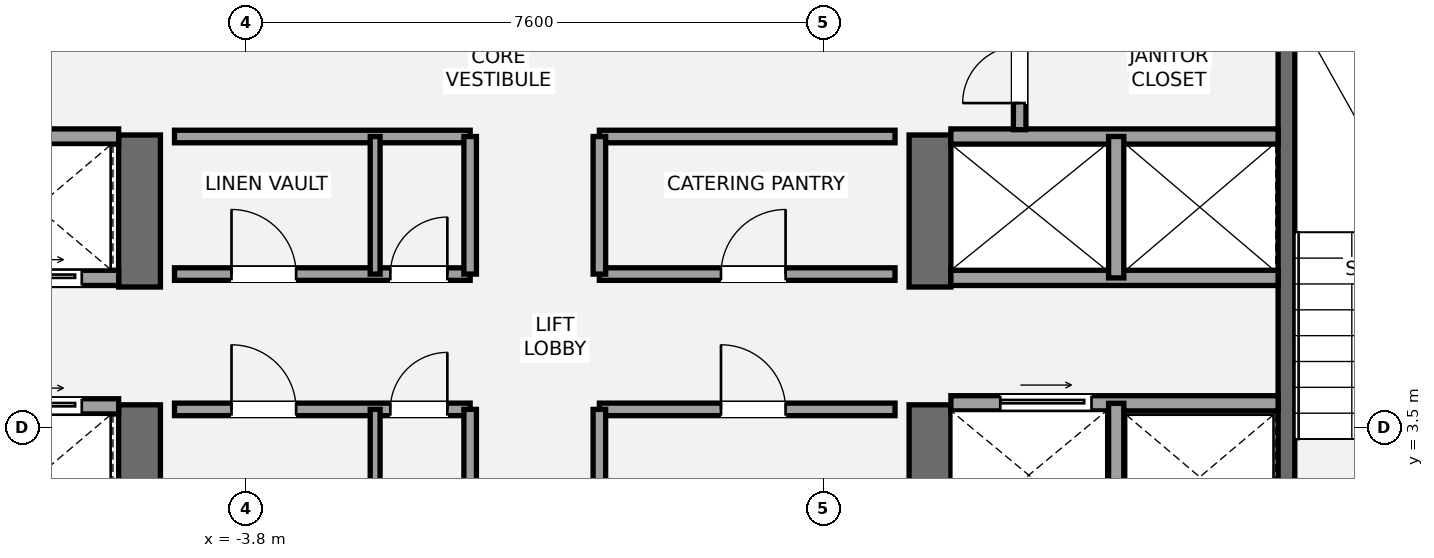
"""IFC4 building model, lengths in metres.
Left out: names, types, materials, properties, quantities, classifications, styles, units other than length and angle.
Written with IfcOpenShell. Run it as: python <this file> out.ifc"""

import sys

from ifc_helpers import new_model, si_unit, direction, frame, frame_2d, origin, place, context, subcontext, project, spatial, rectangle, extrude, element, fill, save


model = new_model("IFC4")
c1 = context("Model", 3, precision=1e-05, world=origin(), true_north=direction((0.0, 1.0)))
c2 = subcontext(c1, "Body", "Model", "MODEL_VIEW")
j1 = project(units=[si_unit("LENGTHUNIT", "METRE"), si_unit("PLANEANGLEUNIT", "RADIAN")], contexts=[c1])
p1 = place(None, origin())
s1 = spatial("IfcSite", under=j1, at=p1, CompositionType="ELEMENT")
p2 = place(p1, origin())
s2 = spatial("IfcBuilding", under=s1, at=p2, CompositionType="ELEMENT")
p3 = place(p2, frame((0.0, 0.0, 241.5)))
s3 = spatial("IfcBuildingStorey", under=s2, at=p3, CompositionType="ELEMENT", Elevation=241.5)
p4 = place(p3, frame((-5.2, 1.3, 0.0), z_axis=(0.0, 0.0, 1.0), x_axis=(0.0, 1.0, 0.0)))
e1 = element("IfcWall", 1, at=p4, inside=s3, PredefinedType="SHEAR", context=c2, shape_type="SweptSolid", body=[
    extrude(rectangle(XDim=2.5, YDim=0.55, at=frame_2d((1.25, 0.0))), origin(), (0.0, 0.0, 1.0), 3.15),
])
p5 = place(p3, frame((-5.2, 5.35, 0.0), z_axis=(0.0, 0.0, 1.0), x_axis=(0.0, 1.0, 0.0)))
e2 = element("IfcWall", 2, at=p5, inside=s3, PredefinedType="SHEAR", context=c2, shape_type="SweptSolid", body=[
    extrude(rectangle(XDim=2.0, YDim=0.55, at=frame_2d((1.0, 0.0))), origin(), (0.0, 0.0, 1.0), 3.15),
])
p6 = place(p3, frame((5.2, 1.3, 0.0), z_axis=(0.0, 0.0, 1.0), x_axis=(0.0, 1.0, 0.0)))
e3 = element("IfcWall", 3, at=p6, inside=s3, PredefinedType="SHEAR", context=c2, shape_type="SweptSolid", body=[
    extrude(rectangle(XDim=2.5, YDim=0.55, at=frame_2d((1.25, 0.0))), origin(), (0.0, 0.0, 1.0), 3.15),
])
p7 = place(p3, frame((5.2, 5.35, 0.0), z_axis=(0.0, 0.0, 1.0), x_axis=(0.0, 1.0, 0.0)))
e4 = element("IfcWall", 4, at=p7, inside=s3, PredefinedType="SHEAR", context=c2, shape_type="SweptSolid", body=[
    extrude(rectangle(XDim=2.0, YDim=0.55, at=frame_2d((1.0, 0.0))), origin(), (0.0, 0.0, 1.0), 3.15),
])
p8 = place(p3, frame((9.89, 1.85, 0.0), z_axis=(0.0, 0.0, 1.0), x_axis=(0.0, 1.0, 0.0)))
e5 = element("IfcWall", 5, at=p8, inside=s3, PredefinedType="SHEAR", context=c2, shape_type="SweptSolid", body=[
    extrude(rectangle(XDim=7.15, YDim=0.22, at=frame_2d((3.575, 0.0))), origin(), (0.0, 0.0, 1.0), 3.15),
])
p9 = place(p3, frame((-9.78, 3.78, 0.0), z_axis=(0.0, 0.0, 1.0), x_axis=(1.0, 0.0, 0.0)))
e6 = element("IfcWall", 6, at=p9, inside=s3, PredefinedType="SOLIDWALL", context=c2, shape_type="SweptSolid", body=[
    extrude(rectangle(XDim=4.305, YDim=0.2, at=frame_2d((2.152, 0.0))), origin(), (0.0, 0.0, 1.0), 2.97),
])
p10 = place(p9, frame((2.72, 0.0, 0.0)))
e7 = element("IfcOpeningElement", 7, at=p10, cuts=e6, PredefinedType="OPENING", context=c2, shape_type="SweptSolid", body=[
    extrude(rectangle(XDim=1.1, YDim=2.2, at=frame_2d((0.55, 1.1))), frame((0.0, 0.11, 0.0), z_axis=(0.0, -1.0, 0.0), x_axis=(1.0, 0.0, 0.0)), (0.0, 0.0, 1.0), 0.22),
])
p11 = place(p3, frame((-9.78, 5.47, 0.0), z_axis=(0.0, 0.0, 1.0), x_axis=(1.0, 0.0, 0.0)))
e8 = element("IfcWall", 8, at=p11, inside=s3, PredefinedType="SOLIDWALL", context=c2, shape_type="SweptSolid", body=[
    extrude(rectangle(XDim=4.305, YDim=0.2, at=frame_2d((2.152, 0.0))), origin(), (0.0, 0.0, 1.0), 2.97),
])
p12 = place(p11, frame((0.55, 0.0, 0.0)))
e9 = element("IfcOpeningElement", 9, at=p12, cuts=e8, PredefinedType="OPENING", context=c2, shape_type="SweptSolid", body=[
    extrude(rectangle(XDim=1.1, YDim=2.2, at=frame_2d((0.55, 1.1))), frame((0.0, 0.11, 0.0), z_axis=(0.0, -1.0, 0.0), x_axis=(1.0, 0.0, 0.0)), (0.0, 0.0, 1.0), 0.22),
])
p13 = place(p11, frame((2.72, 0.0, 0.0)))
e10 = element("IfcOpeningElement", 10, at=p13, cuts=e8, PredefinedType="OPENING", context=c2, shape_type="SweptSolid", body=[
    extrude(rectangle(XDim=1.1, YDim=2.2, at=frame_2d((0.55, 1.1))), frame((0.0, 0.11, 0.0), z_axis=(0.0, -1.0, 0.0), x_axis=(1.0, 0.0, 0.0)), (0.0, 0.0, 1.0), 0.22),
])
p14 = place(p3, frame((-9.78, 7.33, 0.0), z_axis=(0.0, 0.0, 1.0), x_axis=(1.0, 0.0, 0.0)))
e11 = element("IfcWall", 11, at=p14, inside=s3, PredefinedType="SOLIDWALL", context=c2, shape_type="SweptSolid", body=[
    extrude(rectangle(XDim=4.305, YDim=0.2, at=frame_2d((2.152, 0.0))), origin(), (0.0, 0.0, 1.0), 2.97),
])
p15 = place(p3, frame((5.475, 3.82, 0.0), z_axis=(0.0, 0.0, 1.0), x_axis=(1.0, 0.0, 0.0)))
e12 = element("IfcWall", 12, at=p15, inside=s3, PredefinedType="SOLIDWALL", context=c2, shape_type="SweptSolid", body=[
    extrude(rectangle(XDim=4.305, YDim=0.2, at=frame_2d((2.152, 0.0))), origin(), (0.0, 0.0, 1.0), 2.97),
])
p16 = place(p15, frame((0.65, 0.0, 0.0)))
e13 = element("IfcOpeningElement", 13, at=p16, cuts=e12, PredefinedType="OPENING", context=c2, shape_type="SweptSolid", body=[
    extrude(rectangle(XDim=1.2, YDim=2.2, at=frame_2d((0.6, 1.1))), frame((0.0, 0.11, 0.0), z_axis=(0.0, -1.0, 0.0), x_axis=(1.0, 0.0, 0.0)), (0.0, 0.0, 1.0), 0.22),
])
p17 = place(p3, frame((7.65, 1.85, 0.0), z_axis=(0.0, 0.0, 1.0), x_axis=(0.0, 1.0, 0.0)))
e14 = element("IfcWall", 14, at=p17, inside=s3, PredefinedType="SOLIDWALL", context=c2, shape_type="SweptSolid", body=[
    extrude(rectangle(XDim=1.97, YDim=0.2, at=frame_2d((0.985, 0.0))), origin(), (0.0, 0.0, 1.0), 2.97),
])
for number, where, z_axis, x_axis in (
    (15, (5.475, 5.47, 0.0), (0.0, 0.0, 1.0), (1.0, 0.0, 0.0)),
    (16, (5.475, 7.33, 0.0), (0.0, 0.0, 1.0), (1.0, 0.0, 0.0)),
):
    element("IfcWall", number, at=place(p3, frame(where, z_axis=z_axis, x_axis=x_axis)), inside=s3, PredefinedType="SOLIDWALL", context=c2, shape_type="SweptSolid", body=[
        extrude(rectangle(XDim=4.305, YDim=0.2, at=frame_2d((2.152, 0.0))), origin(), (0.0, 0.0, 1.0), 2.97),
    ])
p18 = place(p3, frame((7.65, 5.47, 0.0), z_axis=(0.0, 0.0, 1.0), x_axis=(0.0, 1.0, 0.0)))
e17 = element("IfcWall", 17, at=p18, inside=s3, PredefinedType="SOLIDWALL", context=c2, shape_type="SweptSolid", body=[
    extrude(rectangle(XDim=1.86, YDim=0.2, at=frame_2d((0.93, 0.0))), origin(), (0.0, 0.0, 1.0), 2.97),
])
p19 = place(p3, frame((-4.74, 3.74, 0.0), z_axis=(0.0, 0.0, 1.0), x_axis=(1.0, 0.0, 0.0)))
e18 = element("IfcWall", 18, at=p19, inside=s3, PredefinedType="PARTITIONING", context=c2, shape_type="SweptSolid", body=[
    extrude(rectangle(XDim=3.89, YDim=0.165, at=frame_2d((1.945, 0.0))), origin(), (0.0, 0.0, 1.0), 2.97),
])
p20 = place(p19, frame((0.75, 0.0, 0.0)))
e19 = element("IfcOpeningElement", 19, at=p20, cuts=e18, PredefinedType="OPENING", context=c2, shape_type="SweptSolid", body=[
    extrude(rectangle(XDim=0.85, YDim=2.1, at=frame_2d((0.425, 1.05))), frame((0.0, 0.093, 0.0), z_axis=(0.0, -1.0, 0.0), x_axis=(1.0, 0.0, 0.0)), (0.0, 0.0, 1.0), 0.185),
])
p21 = place(p19, frame((2.84, 0.0, 0.0)))
e20 = element("IfcOpeningElement", 20, at=p21, cuts=e18, PredefinedType="OPENING", context=c2, shape_type="SweptSolid", body=[
    extrude(rectangle(XDim=0.75, YDim=2.1, at=frame_2d((0.375, 1.05))), frame((0.0, 0.093, 0.0), z_axis=(0.0, -1.0, 0.0), x_axis=(1.0, 0.0, 0.0)), (0.0, 0.0, 1.0), 0.185),
])
p22 = place(p3, frame((-0.85, 1.92, 0.0), z_axis=(0.0, 0.0, 1.0), x_axis=(0.0, 1.0, 0.0)))
e21 = element("IfcWall", 21, at=p22, inside=s3, PredefinedType="PARTITIONING", context=c2, shape_type="SweptSolid", body=[
    extrude(rectangle(XDim=1.82, YDim=0.165, at=frame_2d((0.91, 0.0))), origin(), (0.0, 0.0, 1.0), 2.97),
])
p23 = place(p3, frame((0.85, 3.74, 0.0), z_axis=(0.0, 0.0, 1.0), x_axis=(1.0, 0.0, 0.0)))
e22 = element("IfcWall", 22, at=p23, inside=s3, PredefinedType="PARTITIONING", context=c2, shape_type="SweptSolid", body=[
    extrude(rectangle(XDim=3.89, YDim=0.165, at=frame_2d((1.945, 0.0))), origin(), (0.0, 0.0, 1.0), 2.97),
])
p24 = place(p23, frame((1.6, 0.0, 0.0)))
e23 = element("IfcOpeningElement", 23, at=p24, cuts=e22, PredefinedType="OPENING", context=c2, shape_type="SweptSolid", body=[
    extrude(rectangle(XDim=0.85, YDim=2.1, at=frame_2d((0.425, 1.05))), frame((0.0, 0.093, 0.0), z_axis=(0.0, -1.0, 0.0), x_axis=(1.0, 0.0, 0.0)), (0.0, 0.0, 1.0), 0.185),
])
p25 = place(p3, frame((0.85, 1.92, 0.0), z_axis=(0.0, 0.0, 1.0), x_axis=(0.0, 1.0, 0.0)))
e24 = element("IfcWall", 24, at=p25, inside=s3, PredefinedType="PARTITIONING", context=c2, shape_type="SweptSolid", body=[
    extrude(rectangle(XDim=1.82, YDim=0.165, at=frame_2d((0.91, 0.0))), origin(), (0.0, 0.0, 1.0), 2.97),
])
p26 = place(p3, frame((-2.1, 1.92, 0.0), z_axis=(0.0, 0.0, 1.0), x_axis=(0.0, 1.0, 0.0)))
e25 = element("IfcWall", 25, at=p26, inside=s3, PredefinedType="PARTITIONING", context=c2, shape_type="SweptSolid", body=[
    extrude(rectangle(XDim=1.82, YDim=0.13, at=frame_2d((0.91, 0.0))), origin(), (0.0, 0.0, 1.0), 2.97),
])
p27 = place(p3, frame((-4.74, 5.52, 0.0), z_axis=(0.0, 0.0, 1.0), x_axis=(1.0, 0.0, 0.0)))
e26 = element("IfcWall", 26, at=p27, inside=s3, PredefinedType="PARTITIONING", context=c2, shape_type="SweptSolid", body=[
    extrude(rectangle(XDim=3.89, YDim=0.165, at=frame_2d((1.945, 0.0))), origin(), (0.0, 0.0, 1.0), 2.97),
])
p28 = place(p27, frame((0.75, 0.0, 0.0)))
e27 = element("IfcOpeningElement", 27, at=p28, cuts=e26, PredefinedType="OPENING", context=c2, shape_type="SweptSolid", body=[
    extrude(rectangle(XDim=0.85, YDim=2.1, at=frame_2d((0.425, 1.05))), frame((0.0, 0.093, 0.0), z_axis=(0.0, -1.0, 0.0), x_axis=(1.0, 0.0, 0.0)), (0.0, 0.0, 1.0), 0.185),
])
p29 = place(p27, frame((2.84, 0.0, 0.0)))
e28 = element("IfcOpeningElement", 28, at=p29, cuts=e26, PredefinedType="OPENING", context=c2, shape_type="SweptSolid", body=[
    extrude(rectangle(XDim=0.75, YDim=2.1, at=frame_2d((0.375, 1.05))), frame((0.0, 0.093, 0.0), z_axis=(0.0, -1.0, 0.0), x_axis=(1.0, 0.0, 0.0)), (0.0, 0.0, 1.0), 0.185),
])
p30 = place(p3, frame((-4.74, 7.33, 0.0), z_axis=(0.0, 0.0, 1.0), x_axis=(1.0, 0.0, 0.0)))
e29 = element("IfcWall", 29, at=p30, inside=s3, PredefinedType="PARTITIONING", context=c2, shape_type="SweptSolid", body=[
    extrude(rectangle(XDim=3.89, YDim=0.165, at=frame_2d((1.945, 0.0))), origin(), (0.0, 0.0, 1.0), 2.97),
])
p31 = place(p3, frame((-0.85, 5.52, 0.0), z_axis=(0.0, 0.0, 1.0), x_axis=(0.0, 1.0, 0.0)))
e30 = element("IfcWall", 30, at=p31, inside=s3, PredefinedType="PARTITIONING", context=c2, shape_type="SweptSolid", body=[
    extrude(rectangle(XDim=1.81, YDim=0.165, at=frame_2d((0.905, 0.0))), origin(), (0.0, 0.0, 1.0), 2.97),
])
p32 = place(p3, frame((0.85, 5.52, 0.0), z_axis=(0.0, 0.0, 1.0), x_axis=(1.0, 0.0, 0.0)))
e31 = element("IfcWall", 31, at=p32, inside=s3, PredefinedType="PARTITIONING", context=c2, shape_type="SweptSolid", body=[
    extrude(rectangle(XDim=3.89, YDim=0.165, at=frame_2d((1.945, 0.0))), origin(), (0.0, 0.0, 1.0), 2.97),
])
p33 = place(p32, frame((1.6, 0.0, 0.0)))
e32 = element("IfcOpeningElement", 32, at=p33, cuts=e31, PredefinedType="OPENING", context=c2, shape_type="SweptSolid", body=[
    extrude(rectangle(XDim=0.85, YDim=2.1, at=frame_2d((0.425, 1.05))), frame((0.0, 0.093, 0.0), z_axis=(0.0, -1.0, 0.0), x_axis=(1.0, 0.0, 0.0)), (0.0, 0.0, 1.0), 0.185),
])
p34 = place(p3, frame((0.85, 7.33, 0.0), z_axis=(0.0, 0.0, 1.0), x_axis=(1.0, 0.0, 0.0)))
e33 = element("IfcWall", 33, at=p34, inside=s3, PredefinedType="PARTITIONING", context=c2, shape_type="SweptSolid", body=[
    extrude(rectangle(XDim=3.89, YDim=0.165, at=frame_2d((1.945, 0.0))), origin(), (0.0, 0.0, 1.0), 2.97),
])
p35 = place(p3, frame((0.85, 5.52, 0.0), z_axis=(0.0, 0.0, 1.0), x_axis=(0.0, 1.0, 0.0)))
e34 = element("IfcWall", 34, at=p35, inside=s3, PredefinedType="PARTITIONING", context=c2, shape_type="SweptSolid", body=[
    extrude(rectangle(XDim=1.81, YDim=0.165, at=frame_2d((0.905, 0.0))), origin(), (0.0, 0.0, 1.0), 2.97),
])
p36 = place(p3, frame((-2.1, 5.52, 0.0), z_axis=(0.0, 0.0, 1.0), x_axis=(0.0, 1.0, 0.0)))
e35 = element("IfcWall", 35, at=p36, inside=s3, PredefinedType="PARTITIONING", context=c2, shape_type="SweptSolid", body=[
    extrude(rectangle(XDim=1.81, YDim=0.13, at=frame_2d((0.905, 0.0))), origin(), (0.0, 0.0, 1.0), 2.97),
])
p37 = place(p3, frame((6.38, 7.42, 0.0), z_axis=(0.0, 0.0, 1.0), x_axis=(0.0, 1.0, 0.0)))
e36 = element("IfcWall", 36, at=p37, inside=s3, PredefinedType="PARTITIONING", context=c2, shape_type="SweptSolid", body=[
    extrude(rectangle(XDim=1.58, YDim=0.165, at=frame_2d((0.79, 0.0))), origin(), (0.0, 0.0, 1.0), 2.97),
])
p38 = place(p37, frame((0.35, 0.0, 0.0)))
e37 = element("IfcOpeningElement", 37, at=p38, cuts=e36, PredefinedType="OPENING", context=c2, shape_type="SweptSolid", body=[
    extrude(rectangle(XDim=0.75, YDim=2.1, at=frame_2d((0.375, 1.05))), frame((0.0, 0.093, 0.0), z_axis=(0.0, -1.0, 0.0), x_axis=(1.0, 0.0, 0.0)), (0.0, 0.0, 1.0), 0.185),
])
p39 = place(p13, origin())
e38 = element("IfcDoor", 38, at=p39, inside=s3, OperationType="SLIDING_TO_LEFT", PredefinedType="DOOR", context=c2, shape_type="SweptSolid", body=[
    extrude(rectangle(XDim=1.1, YDim=2.2, at=frame_2d((0.55, 1.1))), frame((0.0, 0.025, 0.0), z_axis=(0.0, -1.0, 0.0), x_axis=(1.0, 0.0, 0.0)), (0.0, 0.0, 1.0), 0.05),
])
fill(e10, e38)
p40 = place(p10, origin())
e39 = element("IfcDoor", 39, at=p40, inside=s3, OperationType="SLIDING_TO_LEFT", PredefinedType="DOOR", context=c2, shape_type="SweptSolid", body=[
    extrude(rectangle(XDim=1.1, YDim=2.2, at=frame_2d((0.55, 1.1))), frame((0.0, 0.025, 0.0), z_axis=(0.0, -1.0, 0.0), x_axis=(1.0, 0.0, 0.0)), (0.0, 0.0, 1.0), 0.05),
])
fill(e7, e39)
p41 = place(p16, origin())
e40 = element("IfcDoor", 40, at=p41, inside=s3, OperationType="SLIDING_TO_RIGHT", PredefinedType="DOOR", context=c2, shape_type="SweptSolid", body=[
    extrude(rectangle(XDim=1.2, YDim=2.2, at=frame_2d((0.6, 1.1))), frame((0.0, 0.025, 0.0), z_axis=(0.0, -1.0, 0.0), x_axis=(1.0, 0.0, 0.0)), (0.0, 0.0, 1.0), 0.05),
])
fill(e13, e40)
p42 = place(p20, origin())
e41 = element("IfcDoor", 41, at=p42, inside=s3, OperationType="SINGLE_SWING_LEFT", PredefinedType="DOOR", context=c2, shape_type="SweptSolid", body=[
    extrude(rectangle(XDim=0.85, YDim=2.1, at=frame_2d((0.425, 1.05))), frame((0.0, 0.025, 0.0), z_axis=(0.0, -1.0, 0.0), x_axis=(1.0, 0.0, 0.0)), (0.0, 0.0, 1.0), 0.05),
])
fill(e19, e41)
p43 = place(p21, origin())
e42 = element("IfcDoor", 42, at=p43, inside=s3, OperationType="SINGLE_SWING_RIGHT", PredefinedType="DOOR", context=c2, shape_type="SweptSolid", body=[
    extrude(rectangle(XDim=0.75, YDim=2.1, at=frame_2d((0.375, 1.05))), frame((0.0, 0.025, 0.0), z_axis=(0.0, -1.0, 0.0), x_axis=(1.0, 0.0, 0.0)), (0.0, 0.0, 1.0), 0.05),
])
fill(e20, e42)
p44 = place(p24, origin())
e43 = element("IfcDoor", 43, at=p44, inside=s3, OperationType="SINGLE_SWING_LEFT", PredefinedType="DOOR", context=c2, shape_type="SweptSolid", body=[
    extrude(rectangle(XDim=0.85, YDim=2.1, at=frame_2d((0.425, 1.05))), frame((0.0, 0.025, 0.0), z_axis=(0.0, -1.0, 0.0), x_axis=(1.0, 0.0, 0.0)), (0.0, 0.0, 1.0), 0.05),
])
fill(e23, e43)
p45 = place(p28, origin())
e44 = element("IfcDoor", 44, at=p45, inside=s3, OperationType="SINGLE_SWING_LEFT", PredefinedType="DOOR", context=c2, shape_type="SweptSolid", body=[
    extrude(rectangle(XDim=0.85, YDim=2.1, at=frame_2d((0.425, 1.05))), frame((0.0, 0.025, 0.0), z_axis=(0.0, -1.0, 0.0), x_axis=(1.0, 0.0, 0.0)), (0.0, 0.0, 1.0), 0.05),
])
fill(e27, e44)
p46 = place(p29, origin())
e45 = element("IfcDoor", 45, at=p46, inside=s3, OperationType="SINGLE_SWING_RIGHT", PredefinedType="DOOR", context=c2, shape_type="SweptSolid", body=[
    extrude(rectangle(XDim=0.75, YDim=2.1, at=frame_2d((0.375, 1.05))), frame((0.0, 0.025, 0.0), z_axis=(0.0, -1.0, 0.0), x_axis=(1.0, 0.0, 0.0)), (0.0, 0.0, 1.0), 0.05),
])
fill(e28, e45)
p47 = place(p33, origin())
e46 = element("IfcDoor", 46, at=p47, inside=s3, OperationType="SINGLE_SWING_RIGHT", PredefinedType="DOOR", context=c2, shape_type="SweptSolid", body=[
    extrude(rectangle(XDim=0.85, YDim=2.1, at=frame_2d((0.425, 1.05))), frame((0.0, 0.025, 0.0), z_axis=(0.0, -1.0, 0.0), x_axis=(1.0, 0.0, 0.0)), (0.0, 0.0, 1.0), 0.05),
])
fill(e32, e46)
p48 = place(p38, origin())
e47 = element("IfcDoor", 47, at=p48, inside=s3, OperationType="SINGLE_SWING_LEFT", PredefinedType="DOOR", context=c2, shape_type="SweptSolid", body=[
    extrude(rectangle(XDim=0.75, YDim=2.1, at=frame_2d((0.375, 1.05))), frame((0.0, 0.025, 0.0), z_axis=(0.0, -1.0, 0.0), x_axis=(1.0, 0.0, 0.0)), (0.0, 0.0, 1.0), 0.05),
])
fill(e37, e47)
save(model, sys.argv[1])
